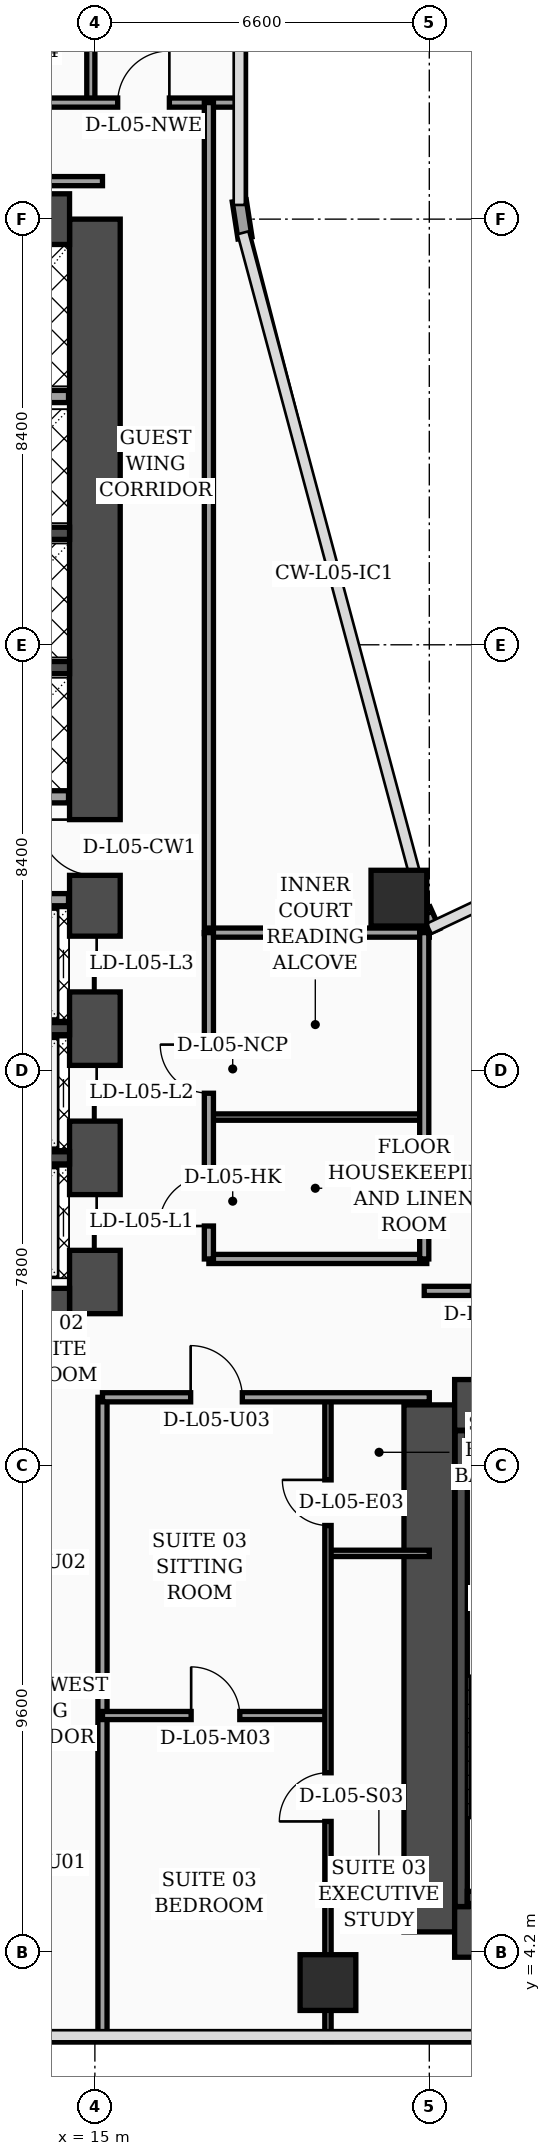
"""IFC4 building model, lengths in metres.
Left out: names, types, materials, properties, quantities, classifications, styles, units other than length and angle.
Written with IfcOpenShell. Run it as: python <this file> out.ifc"""

import sys

from ifc_helpers import new_model, si_unit, direction, frame, frame_2d, origin, origin_2d, place, context, subcontext, project, spatial, rectangle, hollow_rectangle, extrude, element, fill, save


model = new_model("IFC4")
c1 = context("Model", 3, precision=1e-05, world=origin(), true_north=direction((0.0, 1.0)))
c2 = subcontext(c1, "Body", "Model", "MODEL_VIEW")
j1 = project(units=[si_unit("LENGTHUNIT", "METRE"), si_unit("PLANEANGLEUNIT", "RADIAN")], contexts=[c1])
p1 = place(None, origin())
s1 = spatial("IfcSite", under=j1, at=p1, CompositionType="ELEMENT")
p2 = place(p1, origin())
s2 = spatial("IfcBuilding", under=s1, at=p2, CompositionType="ELEMENT")
p3 = place(p2, frame((0.0, 0.0, 27.0)))
s3 = spatial("IfcBuildingStorey", under=s2, at=p3, CompositionType="ELEMENT", Elevation=27.0)
p4 = place(p3, frame((15.0, 16.8, 0.0), z_axis=(0.0, 0.0, 1.0), x_axis=(0.0, 1.0, 0.0)))
e1 = element("IfcWall", 1, at=p4, inside=s3, PredefinedType="SHEAR", context=c2, shape_type="SweptSolid", body=[
    extrude(rectangle(XDim=21.6, YDim=1.0, at=frame_2d((10.8, 0.0))), origin(), (0.0, 0.0, 1.0), 3.56),
])
p5 = place(p4, frame((8.65, 0.0, 0.0)))
e2 = element("IfcOpeningElement", 2, at=p5, cuts=e1, PredefinedType="OPENING", context=c2, shape_type="SweptSolid", body=[
    extrude(rectangle(XDim=1.1, YDim=2.2, at=frame_2d((0.55, 1.1))), frame((0.0, 0.51, 0.0), z_axis=(0.0, -1.0, 0.0), x_axis=(1.0, 0.0, 0.0)), (0.0, 0.0, 1.0), 1.02),
])
p6 = place(p4, frame((1.25, 0.0, 0.0)))
e3 = element("IfcOpeningElement", 3, at=p6, cuts=e1, PredefinedType="OPENING", context=c2, shape_type="SweptSolid", body=[
    extrude(rectangle(XDim=1.1, YDim=2.2, at=frame_2d((0.55, 1.1))), frame((0.0, 0.51, 0.0), z_axis=(0.0, -1.0, 0.0), x_axis=(1.0, 0.0, 0.0)), (0.0, 0.0, 1.0), 1.02),
])
p7 = place(p4, frame((3.8, 0.0, 0.0)))
e4 = element("IfcOpeningElement", 4, at=p7, cuts=e1, PredefinedType="OPENING", context=c2, shape_type="SweptSolid", body=[
    extrude(rectangle(XDim=1.1, YDim=2.2, at=frame_2d((0.55, 1.1))), frame((0.0, 0.51, 0.0), z_axis=(0.0, -1.0, 0.0), x_axis=(1.0, 0.0, 0.0)), (0.0, 0.0, 1.0), 1.02),
])
p8 = place(p4, frame((6.35, 0.0, 0.0)))
e5 = element("IfcOpeningElement", 5, at=p8, cuts=e1, PredefinedType="OPENING", context=c2, shape_type="SweptSolid", body=[
    extrude(rectangle(XDim=1.1, YDim=2.2, at=frame_2d((0.55, 1.1))), frame((0.0, 0.51, 0.0), z_axis=(0.0, -1.0, 0.0), x_axis=(1.0, 0.0, 0.0)), (0.0, 0.0, 1.0), 1.02),
])
for number, where, z_axis, x_axis in (
    (6, (4.7, 38.4, 0.0), (0.0, 0.0, 1.0), (1.0, 0.0, 0.0)),
    (7, (4.7, 16.8, 0.0), (0.0, 0.0, 1.0), (1.0, 0.0, 0.0)),
):
    element("IfcWall", number, at=place(p3, frame(where, z_axis=z_axis, x_axis=x_axis)), inside=s3, PredefinedType="SHEAR", context=c2, shape_type="SweptSolid", body=[
        extrude(rectangle(XDim=9.8, YDim=1.0, at=frame_2d((4.9, 0.0))), origin(), (0.0, 0.0, 1.0), 3.56),
    ])
p9 = place(p3, frame((21.6, 4.6, 0.0), z_axis=(0.0, 0.0, 1.0), x_axis=(0.0, 1.0, 0.0)))
e8 = element("IfcWall", 8, at=p9, inside=s3, PredefinedType="SHEAR", context=c2, shape_type="SweptSolid", body=[
    extrude(rectangle(XDim=10.4, YDim=1.0, at=frame_2d((5.2, 0.0))), origin(), (0.0, 0.0, 1.0), 3.56),
])
p10 = place(p3, frame((22.1, 15.0, 0.0), z_axis=(0.0, 0.0, 1.0), x_axis=(1.0, 0.0, 0.0)))
e9 = element("IfcWall", 9, at=p10, inside=s3, PredefinedType="SHEAR", context=c2, shape_type="SweptSolid", body=[
    extrude(rectangle(XDim=9.8, YDim=1.0, at=frame_2d((4.9, 0.0))), origin(), (0.0, 0.0, 1.0), 3.56),
])
p11 = place(p10, frame((4.8, 0.0, 0.0)))
e10 = element("IfcOpeningElement", 10, at=p11, cuts=e9, PredefinedType="OPENING", context=c2, shape_type="SweptSolid", body=[
    extrude(rectangle(XDim=1.1, YDim=2.2, at=frame_2d((0.55, 1.1))), frame((0.0, 0.51, 0.0), z_axis=(0.0, -1.0, 0.0), x_axis=(1.0, 0.0, 0.0)), (0.0, 0.0, 1.0), 1.02),
])
p12 = place(p3, frame((22.1, 4.6, 0.0), z_axis=(0.0, 0.0, 1.0), x_axis=(1.0, 0.0, 0.0)))
e11 = element("IfcWall", 11, at=p12, inside=s3, PredefinedType="SHEAR", context=c2, shape_type="SweptSolid", body=[
    extrude(rectangle(XDim=9.8, YDim=1.0, at=frame_2d((4.9, 0.0))), origin(), (0.0, 0.0, 1.0), 3.56),
])
p13 = place(p3, frame((22.23, 5.1, 0.0), z_axis=(0.0, 0.0, 1.0), x_axis=(0.0, 1.0, 0.0)))
e12 = element("IfcWall", 12, at=p13, inside=s3, PredefinedType="SOLIDWALL", context=c2, shape_type="SweptSolid", body=[
    extrude(rectangle(XDim=9.39, YDim=0.24, at=frame_2d((4.695, 0.0))), origin(), (0.0, 0.0, 1.0), 3.56),
])
for number, where, z_axis, x_axis in (
    (13, (22.35, 5.28, 0.0), (0.0, 0.0, 1.0), (1.0, 0.0, 0.0)),
    (14, (22.35, 14.37, 0.0), (0.0, 0.0, 1.0), (1.0, 0.0, 0.0)),
):
    element("IfcWall", number, at=place(p3, frame(where, z_axis=z_axis, x_axis=x_axis)), inside=s3, PredefinedType="SOLIDWALL", context=c2, shape_type="SweptSolid", body=[
        extrude(rectangle(XDim=3.1, YDim=0.24, at=frame_2d((1.55, 0.0))), origin(), (0.0, 0.0, 1.0), 3.56),
    ])
for number, where, z_axis, x_axis in (
    (15, (12.18, 19.875, 0.0), (0.0, 0.0, 1.0), (1.0, 0.0, 0.0)),
    (16, (12.18, 22.425, 0.0), (0.0, 0.0, 1.0), (1.0, 0.0, 0.0)),
    (17, (12.18, 29.55, 0.0), (0.0, 0.0, 1.0), (1.0, 0.0, 0.0)),
    (18, (12.18, 32.2, 0.0), (0.0, 0.0, 1.0), (1.0, 0.0, 0.0)),
):
    element("IfcWall", number, at=place(p3, frame(where, z_axis=z_axis, x_axis=x_axis)), inside=s3, PredefinedType="SOLIDWALL", context=c2, shape_type="SweptSolid", body=[
        extrude(rectangle(XDim=2.32, YDim=0.24, at=frame_2d((1.16, 0.0))), origin(), (0.0, 0.0, 1.0), 3.56),
    ])
for number, where, z_axis, x_axis in (
    (19, (21.0, 25.0, 0.0), (0.0, 0.0, 1.0), (1.0, 0.0, 0.0)),
    (20, (19.6, 3.6, 0.0), (0.0, 0.0, 1.0), (1.0, 0.0, 0.0)),
):
    element("IfcColumn", number, at=place(p3, frame(where, z_axis=z_axis, x_axis=x_axis)), inside=s3, PredefinedType="COLUMN", context=c2, shape_type="SweptSolid", body=[
        extrude(hollow_rectangle(XDim=1.1, YDim=1.1, WallThickness=0.045, at=origin_2d()), origin(), (0.0, 0.0, 1.0), 3.56),
    ])
p14 = place(p3, frame((21.68, 24.34, 0.0), z_axis=(0.0, 0.0, 1.0), x_axis=(-0.40758134973, 0.913168901875, 0.0)))
e21 = element("IfcWall", 21, at=p14, inside=s3, PredefinedType="SOLIDWALL", context=c2, shape_type="SweptSolid", body=[
    extrude(rectangle(XDim=0.471, YDim=0.28, at=frame_2d((0.235, 0.0))), origin(), (0.0, 0.0, 1.0), 3.56),
])
p15 = place(p3, frame((17.962, 38.03, 0.0), z_axis=(0.0, 0.0, 1.0), x_axis=(-0.15141125477, 0.988470855377, 0.0)))
e22 = element("IfcWall", 22, at=p15, inside=s3, PredefinedType="SOLIDWALL", context=c2, shape_type="SweptSolid", body=[
    extrude(rectangle(XDim=0.739, YDim=0.28, at=frame_2d((0.369, 0.0))), origin(), (0.0, 0.0, 1.0), 3.56),
])
p16 = place(p3, frame((12.15, 24.97, 0.0), z_axis=(0.0, 0.0, 1.0), x_axis=(1.0, 0.0, 0.0)))
e23 = element("IfcWall", 23, at=p16, inside=s3, PredefinedType="SOLIDWALL", context=c2, shape_type="SweptSolid", body=[
    extrude(rectangle(XDim=2.33, YDim=0.24, at=frame_2d((1.165, 0.0))), origin(), (0.0, 0.0, 1.0), 2.84),
])
p17 = place(p3, frame((12.25, 27.0, 0.0), z_axis=(0.0, 0.0, 1.0), x_axis=(1.0, 0.0, 0.0)))
e24 = element("IfcWall", 24, at=p17, inside=s3, PredefinedType="SOLIDWALL", context=c2, shape_type="SweptSolid", body=[
    extrude(rectangle(XDim=2.23, YDim=0.24, at=frame_2d((1.115, 0.0))), origin(), (0.0, 0.0, 1.0), 3.56),
])
p18 = place(p3, frame((9.66, 34.9, 0.0), z_axis=(0.0, 0.0, 1.0), x_axis=(1.0, 0.0, 0.0)))
e25 = element("IfcWall", 25, at=p18, inside=s3, PredefinedType="SOLIDWALL", context=c2, shape_type="SweptSolid", body=[
    extrude(rectangle(XDim=4.82, YDim=0.24, at=frame_2d((2.41, 0.0))), origin(), (0.0, 0.0, 1.0), 3.56),
])
p19 = place(p3, frame((15.15, 2.44, 0.0), z_axis=(0.0, 0.0, 1.0), x_axis=(0.0, 1.0, 0.0)))
e26 = element("IfcWall", 26, at=p19, inside=s3, PredefinedType="PARTITIONING", context=c2, shape_type="SweptSolid", body=[
    extrude(rectangle(XDim=12.71, YDim=0.18, at=frame_2d((6.355, 0.0))), origin(), (0.0, 0.0, 1.0), 3.04),
])
p20 = place(p3, frame((19.6, 12.07, 0.0), z_axis=(0.0, 0.0, 1.0), x_axis=(1.0, 0.0, 0.0)))
e27 = element("IfcWall", 27, at=p20, inside=s3, PredefinedType="PARTITIONING", context=c2, shape_type="SweptSolid", body=[
    extrude(rectangle(XDim=2.0, YDim=0.125, at=frame_2d((1.0, 0.0))), origin(), (0.0, 0.0, 1.0), 3.56),
])
p21 = place(p3, frame((15.15, 8.87, 0.0), z_axis=(0.0, 0.0, 1.0), x_axis=(1.0, 0.0, 0.0)))
e28 = element("IfcWall", 28, at=p21, inside=s3, PredefinedType="PARTITIONING", context=c2, shape_type="SweptSolid", body=[
    extrude(rectangle(XDim=4.45, YDim=0.16, at=frame_2d((2.225, 0.0))), origin(), (0.0, 0.0, 1.0), 3.56),
])
p22 = place(p21, frame((1.75, 0.0, 0.0)))
e29 = element("IfcOpeningElement", 29, at=p22, cuts=e28, PredefinedType="OPENING", context=c2, shape_type="SweptSolid", body=[
    extrude(rectangle(XDim=0.96, YDim=2.2, at=frame_2d((0.48, 1.1))), frame((0.0, 0.09, 0.0), z_axis=(0.0, -1.0, 0.0), x_axis=(1.0, 0.0, 0.0)), (0.0, 0.0, 1.0), 0.18),
])
p23 = place(p3, frame((19.6, 2.44, 0.0), z_axis=(0.0, 0.0, 1.0), x_axis=(0.0, 1.0, 0.0)))
e30 = element("IfcWall", 30, at=p23, inside=s3, PredefinedType="PARTITIONING", context=c2, shape_type="SweptSolid", body=[
    extrude(rectangle(XDim=12.71, YDim=0.125, at=frame_2d((6.355, 0.0))), origin(), (0.0, 0.0, 1.0), 2.34),
])
p24 = place(p23, frame((4.34, 0.0, 0.0)))
e31 = element("IfcOpeningElement", 31, at=p24, cuts=e30, PredefinedType="OPENING", context=c2, shape_type="SweptSolid", body=[
    extrude(rectangle(XDim=0.96, YDim=2.2, at=frame_2d((0.48, 1.1))), frame((0.0, 0.073, 0.0), z_axis=(0.0, -1.0, 0.0), x_axis=(1.0, 0.0, 0.0)), (0.0, 0.0, 1.0), 0.145),
])
p25 = place(p23, frame((10.18, 0.0, 0.0)))
e32 = element("IfcOpeningElement", 32, at=p25, cuts=e30, PredefinedType="OPENING", context=c2, shape_type="SweptSolid", body=[
    extrude(rectangle(XDim=0.9, YDim=2.15, at=frame_2d((0.45, 1.075))), frame((0.0, 0.073, 0.0), z_axis=(0.0, -1.0, 0.0), x_axis=(1.0, 0.0, 0.0)), (0.0, 0.0, 1.0), 0.145),
])
p26 = place(p3, frame((15.15, 15.15, 0.0), z_axis=(0.0, 0.0, 1.0), x_axis=(1.0, 0.0, 0.0)))
e33 = element("IfcWall", 33, at=p26, inside=s3, PredefinedType="PARTITIONING", context=c2, shape_type="SweptSolid", body=[
    extrude(rectangle(XDim=6.45, YDim=0.18, at=frame_2d((3.225, 0.0))), origin(), (0.0, 0.0, 1.0), 2.34),
])
p27 = place(p26, frame((1.74, 0.0, 0.0)))
e34 = element("IfcOpeningElement", 34, at=p27, cuts=e33, PredefinedType="OPENING", context=c2, shape_type="SweptSolid", body=[
    extrude(rectangle(XDim=1.02, YDim=2.2, at=frame_2d((0.51, 1.1))), frame((0.0, 0.1, 0.0), z_axis=(0.0, -1.0, 0.0), x_axis=(1.0, 0.0, 0.0)), (0.0, 0.0, 1.0), 0.2),
])
p28 = place(p3, frame((14.92, 40.7, 0.0), z_axis=(0.0, 0.0, 1.0), x_axis=(0.0, 1.0, 0.0)))
e35 = element("IfcWall", 35, at=p28, inside=s3, PredefinedType="PARTITIONING", context=c2, shape_type="SweptSolid", body=[
    extrude(rectangle(XDim=7.1, YDim=0.16, at=frame_2d((3.55, 0.0))), origin(), (0.0, 0.0, 1.0), 3.04),
])
p29 = place(p3, frame((0.08, 40.7, 0.0), z_axis=(0.0, 0.0, 1.0), x_axis=(1.0, 0.0, 0.0)))
e36 = element("IfcWall", 36, at=p29, inside=s3, PredefinedType="PARTITIONING", context=c2, shape_type="SweptSolid", body=[
    extrude(rectangle(XDim=17.77, YDim=0.18, at=frame_2d((8.885, 0.0))), origin(), (0.0, 0.0, 1.0), 2.84),
])
p30 = place(p29, frame((0.9, 0.0, 0.0)))
e37 = element("IfcOpeningElement", 37, at=p30, cuts=e36, PredefinedType="OPENING", context=c2, shape_type="SweptSolid", body=[
    extrude(rectangle(XDim=1.02, YDim=2.2, at=frame_2d((0.51, 1.1))), frame((0.0, 0.1, 0.0), z_axis=(0.0, -1.0, 0.0), x_axis=(1.0, 0.0, 0.0)), (0.0, 0.0, 1.0), 0.2),
])
p31 = place(p29, frame((7.38, 0.0, 0.0)))
e38 = element("IfcOpeningElement", 38, at=p31, cuts=e36, PredefinedType="OPENING", context=c2, shape_type="SweptSolid", body=[
    extrude(rectangle(XDim=1.02, YDim=2.2, at=frame_2d((0.51, 1.1))), frame((0.0, 0.1, 0.0), z_axis=(0.0, -1.0, 0.0), x_axis=(1.0, 0.0, 0.0)), (0.0, 0.0, 1.0), 0.2),
])
p32 = place(p29, frame((15.37, 0.0, 0.0)))
e39 = element("IfcOpeningElement", 39, at=p32, cuts=e36, PredefinedType="OPENING", context=c2, shape_type="SweptSolid", body=[
    extrude(rectangle(XDim=1.02, YDim=2.2, at=frame_2d((0.51, 1.1))), frame((0.0, 0.1, 0.0), z_axis=(0.0, -1.0, 0.0), x_axis=(1.0, 0.0, 0.0)), (0.0, 0.0, 1.0), 0.2),
])
p33 = place(p3, frame((17.25, 24.3, 0.0), z_axis=(0.0, 0.0, 1.0), x_axis=(0.0, 1.0, 0.0)))
e40 = element("IfcWall", 40, at=p33, inside=s3, PredefinedType="PARTITIONING", context=c2, shape_type="SweptSolid", body=[
    extrude(rectangle(XDim=16.4, YDim=0.18, at=frame_2d((8.2, 0.0))), origin(), (0.0, 0.0, 1.0), 2.84),
])
p34 = place(p3, frame((3.68, 39.15, 0.0), z_axis=(0.0, 0.0, 1.0), x_axis=(1.0, 0.0, 0.0)))
e41 = element("IfcWall", 41, at=p34, inside=s3, PredefinedType="PARTITIONING", context=c2, shape_type="SweptSolid", body=[
    extrude(rectangle(XDim=11.47, YDim=0.18, at=frame_2d((5.735, 0.0))), origin(), (0.0, 0.0, 1.0), 2.84),
])
p35 = place(p3, frame((17.25, 17.88, 0.0), z_axis=(0.0, 0.0, 1.0), x_axis=(1.0, 0.0, 0.0)))
e42 = element("IfcWall", 42, at=p35, inside=s3, PredefinedType="PARTITIONING", context=c2, shape_type="SweptSolid", body=[
    extrude(rectangle(XDim=4.3, YDim=0.18, at=frame_2d((2.15, 0.0))), origin(), (0.0, 0.0, 1.0), 3.56),
])
p36 = place(p3, frame((17.25, 20.68, 0.0), z_axis=(0.0, 0.0, 1.0), x_axis=(1.0, 0.0, 0.0)))
e43 = element("IfcWall", 43, at=p36, inside=s3, PredefinedType="PARTITIONING", context=c2, shape_type="SweptSolid", body=[
    extrude(rectangle(XDim=4.3, YDim=0.125, at=frame_2d((2.15, 0.0))), origin(), (0.0, 0.0, 1.0), 3.56),
])
p37 = place(p3, frame((17.25, 24.32, 0.0), z_axis=(0.0, 0.0, 1.0), x_axis=(1.0, 0.0, 0.0)))
e44 = element("IfcWall", 44, at=p37, inside=s3, PredefinedType="PARTITIONING", context=c2, shape_type="SweptSolid", body=[
    extrude(rectangle(XDim=4.35, YDim=0.18, at=frame_2d((2.175, 0.0))), origin(), (0.0, 0.0, 1.0), 3.56),
])
p38 = place(p3, frame((21.5, 17.88, 0.0), z_axis=(0.0, 0.0, 1.0), x_axis=(0.0, 1.0, 0.0)))
e45 = element("IfcWall", 45, at=p38, inside=s3, PredefinedType="PARTITIONING", context=c2, shape_type="SweptSolid", body=[
    extrude(rectangle(XDim=6.44, YDim=0.18, at=frame_2d((3.22, 0.0))), origin(), (0.0, 0.0, 1.0), 3.56),
])
p39 = place(p3, frame((17.25, 17.88, 0.0), z_axis=(0.0, 0.0, 1.0), x_axis=(0.0, 1.0, 0.0)))
e46 = element("IfcWall", 46, at=p39, inside=s3, PredefinedType="PARTITIONING", context=c2, shape_type="SweptSolid", body=[
    extrude(rectangle(XDim=6.44, YDim=0.18, at=frame_2d((3.22, 0.0))), origin(), (0.0, 0.0, 1.0), 3.56),
])
p40 = place(p39, frame((0.65, 0.0, 0.0)))
e47 = element("IfcOpeningElement", 47, at=p40, cuts=e46, PredefinedType="OPENING", context=c2, shape_type="SweptSolid", body=[
    extrude(rectangle(XDim=0.98, YDim=2.15, at=frame_2d((0.49, 1.075))), frame((0.0, 0.1, 0.0), z_axis=(0.0, -1.0, 0.0), x_axis=(1.0, 0.0, 0.0)), (0.0, 0.0, 1.0), 0.2),
])
p41 = place(p39, frame((3.27, 0.0, 0.0)))
e48 = element("IfcOpeningElement", 48, at=p41, cuts=e46, PredefinedType="OPENING", context=c2, shape_type="SweptSolid", body=[
    extrude(rectangle(XDim=0.96, YDim=2.2, at=frame_2d((0.48, 1.1))), frame((0.0, 0.1, 0.0), z_axis=(0.0, -1.0, 0.0), x_axis=(1.0, 0.0, 0.0)), (0.0, 0.0, 1.0), 0.2),
])
p42 = place(p3, frame((21.5, 17.25, 0.0), z_axis=(0.0, 0.0, 1.0), x_axis=(1.0, 0.0, 0.0)))
e49 = element("IfcWall", 49, at=p42, inside=s3, PredefinedType="PARTITIONING", context=c2, shape_type="SweptSolid", body=[
    extrude(rectangle(XDim=28.65, YDim=0.18, at=frame_2d((14.325, 0.0))), origin(), (0.0, 0.0, 1.0), 2.84),
])
p43 = place(p42, frame((0.95, 0.0, 0.0)))
e50 = element("IfcOpeningElement", 50, at=p43, cuts=e49, PredefinedType="OPENING", context=c2, shape_type="SweptSolid", body=[
    extrude(rectangle(XDim=1.02, YDim=2.2, at=frame_2d((0.51, 1.1))), frame((0.0, 0.1, 0.0), z_axis=(0.0, -1.0, 0.0), x_axis=(1.0, 0.0, 0.0)), (0.0, 0.0, 1.0), 0.2),
])
p44 = place(p42, frame((15.23, 0.0, 0.0)))
e51 = element("IfcOpeningElement", 51, at=p44, cuts=e49, PredefinedType="OPENING", context=c2, shape_type="SweptSolid", body=[
    extrude(rectangle(XDim=1.02, YDim=2.2, at=frame_2d((0.51, 1.1))), frame((0.0, 0.1, 0.0), z_axis=(0.0, -1.0, 0.0), x_axis=(1.0, 0.0, 0.0)), (0.0, 0.0, 1.0), 0.2),
])
p45 = place(p22, origin())
e52 = element("IfcDoor", 52, at=p45, inside=s3, OperationType="SINGLE_SWING_LEFT", PredefinedType="DOOR", context=c2, shape_type="SweptSolid", body=[
    extrude(rectangle(XDim=0.96, YDim=2.2, at=frame_2d((0.48, 1.1))), frame((0.0, 0.025, 0.0), z_axis=(0.0, -1.0, 0.0), x_axis=(1.0, 0.0, 0.0)), (0.0, 0.0, 1.0), 0.05),
])
fill(e29, e52)
p46 = place(p24, origin())
e53 = element("IfcDoor", 53, at=p46, inside=s3, OperationType="SINGLE_SWING_LEFT", PredefinedType="DOOR", context=c2, shape_type="SweptSolid", body=[
    extrude(rectangle(XDim=0.96, YDim=2.2, at=frame_2d((0.48, 1.1))), frame((0.0, 0.025, 0.0), z_axis=(0.0, -1.0, 0.0), x_axis=(1.0, 0.0, 0.0)), (0.0, 0.0, 1.0), 0.05),
])
fill(e31, e53)
p47 = place(p25, origin())
e54 = element("IfcDoor", 54, at=p47, inside=s3, OperationType="SINGLE_SWING_RIGHT", PredefinedType="DOOR", context=c2, shape_type="SweptSolid", body=[
    extrude(rectangle(XDim=0.9, YDim=2.15, at=frame_2d((0.45, 1.075))), frame((0.0, 0.025, 0.0), z_axis=(0.0, -1.0, 0.0), x_axis=(1.0, 0.0, 0.0)), (0.0, 0.0, 1.0), 0.05),
])
fill(e32, e54)
p48 = place(p27, origin())
e55 = element("IfcDoor", 55, at=p48, inside=s3, OperationType="SINGLE_SWING_LEFT", PredefinedType="DOOR", context=c2, shape_type="SweptSolid", body=[
    extrude(rectangle(XDim=1.02, YDim=2.2, at=frame_2d((0.51, 1.1))), frame((0.0, 0.025, 0.0), z_axis=(0.0, -1.0, 0.0), x_axis=(1.0, 0.0, 0.0)), (0.0, 0.0, 1.0), 0.05),
])
fill(e34, e55)
p49 = place(p32, origin())
e56 = element("IfcDoor", 56, at=p49, inside=s3, OperationType="SINGLE_SWING_RIGHT", PredefinedType="DOOR", context=c2, shape_type="SweptSolid", body=[
    extrude(rectangle(XDim=1.02, YDim=2.2, at=frame_2d((0.51, 1.1))), frame((0.0, 0.025, 0.0), z_axis=(0.0, -1.0, 0.0), x_axis=(1.0, 0.0, 0.0)), (0.0, 0.0, 1.0), 0.05),
])
fill(e39, e56)
p50 = place(p40, origin())
e57 = element("IfcDoor", 57, at=p50, inside=s3, OperationType="SINGLE_SWING_LEFT", PredefinedType="DOOR", context=c2, shape_type="SweptSolid", body=[
    extrude(rectangle(XDim=0.98, YDim=2.15, at=frame_2d((0.49, 1.075))), frame((0.0, 0.025, 0.0), z_axis=(0.0, -1.0, 0.0), x_axis=(1.0, 0.0, 0.0)), (0.0, 0.0, 1.0), 0.05),
])
fill(e47, e57)
p51 = place(p41, origin())
e58 = element("IfcDoor", 58, at=p51, inside=s3, OperationType="SINGLE_SWING_RIGHT", PredefinedType="DOOR", context=c2, shape_type="SweptSolid", body=[
    extrude(rectangle(XDim=0.96, YDim=2.2, at=frame_2d((0.48, 1.1))), frame((0.0, 0.025, 0.0), z_axis=(0.0, -1.0, 0.0), x_axis=(1.0, 0.0, 0.0)), (0.0, 0.0, 1.0), 0.05),
])
fill(e48, e58)
p52 = place(p5, origin())
e59 = element("IfcDoor", 59, at=p52, inside=s3, OperationType="SINGLE_SWING_RIGHT", PredefinedType="DOOR", context=c2, shape_type="SweptSolid", body=[
    extrude(rectangle(XDim=1.1, YDim=2.2, at=frame_2d((0.55, 1.1))), frame((0.0, 0.025, 0.0), z_axis=(0.0, -1.0, 0.0), x_axis=(1.0, 0.0, 0.0)), (0.0, 0.0, 1.0), 0.05),
])
fill(e2, e59)
p53 = place(p6, origin())
e60 = element("IfcDoor", 60, at=p53, inside=s3, OperationType="DOUBLE_DOOR_SLIDING", PredefinedType="DOOR", context=c2, shape_type="SweptSolid", body=[
    extrude(rectangle(XDim=1.1, YDim=2.2, at=frame_2d((0.55, 1.1))), frame((0.0, 0.025, 0.0), z_axis=(0.0, -1.0, 0.0), x_axis=(1.0, 0.0, 0.0)), (0.0, 0.0, 1.0), 0.05),
])
fill(e3, e60)
p54 = place(p7, origin())
e61 = element("IfcDoor", 61, at=p54, inside=s3, OperationType="DOUBLE_DOOR_SLIDING", PredefinedType="DOOR", context=c2, shape_type="SweptSolid", body=[
    extrude(rectangle(XDim=1.1, YDim=2.2, at=frame_2d((0.55, 1.1))), frame((0.0, 0.025, 0.0), z_axis=(0.0, -1.0, 0.0), x_axis=(1.0, 0.0, 0.0)), (0.0, 0.0, 1.0), 0.05),
])
fill(e4, e61)
p55 = place(p8, origin())
e62 = element("IfcDoor", 62, at=p55, inside=s3, OperationType="DOUBLE_DOOR_SLIDING", PredefinedType="DOOR", context=c2, shape_type="SweptSolid", body=[
    extrude(rectangle(XDim=1.1, YDim=2.2, at=frame_2d((0.55, 1.1))), frame((0.0, 0.025, 0.0), z_axis=(0.0, -1.0, 0.0), x_axis=(1.0, 0.0, 0.0)), (0.0, 0.0, 1.0), 0.05),
])
fill(e5, e62)
save(model, sys.argv[1])
